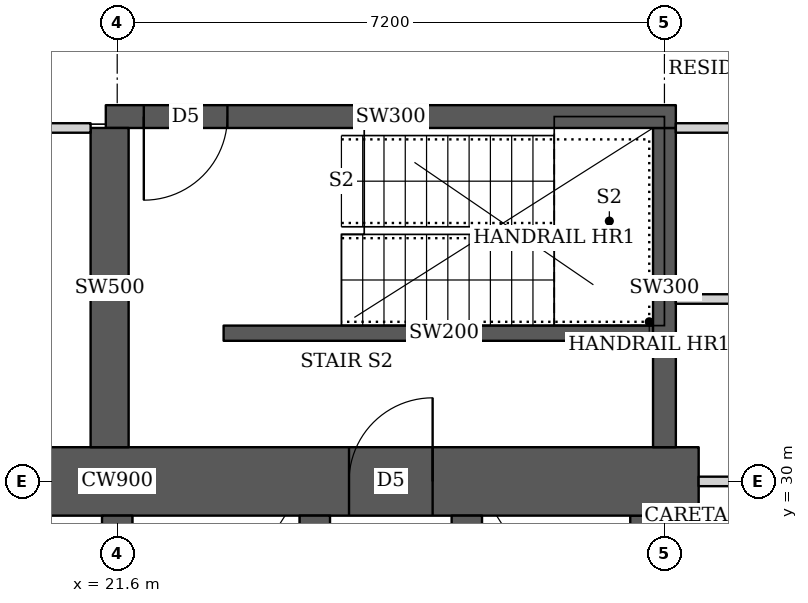
"""IFC4 building model, lengths in metres.
Left out: names, types, materials, properties, quantities, classifications, styles, units other than length and angle.
Written with IfcOpenShell. Run it as: python <this file> out.ifc"""

import sys

from ifc_helpers import new_model, si_unit, direction, frame, frame_2d, origin, place, context, subcontext, project, spatial, rectangle, extrude, element, fill, save


model = new_model("IFC4")
c1 = context("Model", 3, precision=1e-05, world=origin(), true_north=direction((0.0, 1.0)))
c2 = subcontext(c1, "Body", "Model", "MODEL_VIEW")
j1 = project(units=[si_unit("LENGTHUNIT", "METRE"), si_unit("PLANEANGLEUNIT", "RADIAN")], contexts=[c1])
p1 = place(None, origin())
s1 = spatial("IfcSite", under=j1, at=p1, CompositionType="ELEMENT")
p2 = place(p1, origin())
s2 = spatial("IfcBuilding", under=s1, at=p2, CompositionType="ELEMENT")
p3 = place(p2, frame((0.0, 0.0, 180.8)))
s3 = spatial("IfcBuildingStorey", under=s2, at=p3, CompositionType="ELEMENT", Elevation=180.8)
p4 = place(p3, frame((13.95, 30.0, 0.0), z_axis=(0.0, 0.0, 1.0), x_axis=(1.0, 0.0, 0.0)))
e1 = element("IfcWall", 1, at=p4, inside=s3, PredefinedType="SHEAR", context=c2, shape_type="SweptSolid", body=[
    extrude(rectangle(XDim=15.3, YDim=0.9, at=frame_2d((7.65, 0.0))), origin(), (0.0, 0.0, 1.0), 3.75),
])
p5 = place(p4, frame((4.45, 0.0, 0.0)))
e2 = element("IfcOpeningElement", 2, at=p5, cuts=e1, PredefinedType="OPENING", context=c2, shape_type="SweptSolid", body=[
    extrude(rectangle(XDim=1.8, YDim=2.1, at=frame_2d((0.9, 1.05))), frame((0.0, 0.46, 0.0), z_axis=(0.0, -1.0, 0.0), x_axis=(1.0, 0.0, 0.0)), (0.0, 0.0, 1.0), 0.92),
])
p6 = place(p4, frame((10.7, 0.0, 0.0)))
e3 = element("IfcOpeningElement", 3, at=p6, cuts=e1, PredefinedType="OPENING", context=c2, shape_type="SweptSolid", body=[
    extrude(rectangle(XDim=1.1, YDim=2.1, at=frame_2d((0.55, 1.05))), frame((0.0, 0.46, 0.0), z_axis=(0.0, -1.0, 0.0), x_axis=(1.0, 0.0, 0.0)), (0.0, 0.0, 1.0), 0.92),
])
p7 = place(p3, frame((28.8, 15.45, 0.0), z_axis=(0.0, 0.0, 1.0), x_axis=(0.0, 1.0, 0.0)))
e4 = element("IfcWall", 4, at=p7, inside=s3, PredefinedType="SHEAR", context=c2, shape_type="SweptSolid", body=[
    extrude(rectangle(XDim=14.1, YDim=0.9, at=frame_2d((7.05, 0.0))), origin(), (0.0, 0.0, 1.0), 3.75),
])
p8 = place(p3, frame((21.6, 15.45, 0.0), z_axis=(0.0, 0.0, 1.0), x_axis=(0.0, 1.0, 0.0)))
e5 = element("IfcWall", 5, at=p8, inside=s3, PredefinedType="SHEAR", context=c2, shape_type="SweptSolid", body=[
    extrude(rectangle(XDim=14.1, YDim=0.4, at=frame_2d((7.05, 0.0))), origin(), (0.0, 0.0, 1.0), 3.75),
])
p9 = place(p8, frame((0.875, 0.0, 0.0)))
e6 = element("IfcOpeningElement", 6, at=p9, cuts=e5, PredefinedType="OPENING", context=c2, shape_type="SweptSolid", body=[
    extrude(rectangle(XDim=1.1, YDim=2.1, at=frame_2d((0.55, 1.05))), frame((0.0, 0.21, 0.0), z_axis=(0.0, -1.0, 0.0), x_axis=(1.0, 0.0, 0.0)), (0.0, 0.0, 1.0), 0.42),
])
p10 = place(p8, frame((4.625, 0.0, 0.0)))
e7 = element("IfcOpeningElement", 7, at=p10, cuts=e5, PredefinedType="OPENING", context=c2, shape_type="SweptSolid", body=[
    extrude(rectangle(XDim=1.1, YDim=2.1, at=frame_2d((0.55, 1.05))), frame((0.0, 0.21, 0.0), z_axis=(0.0, -1.0, 0.0), x_axis=(1.0, 0.0, 0.0)), (0.0, 0.0, 1.0), 0.42),
])
p11 = place(p8, frame((8.375, 0.0, 0.0)))
e8 = element("IfcOpeningElement", 8, at=p11, cuts=e5, PredefinedType="OPENING", context=c2, shape_type="SweptSolid", body=[
    extrude(rectangle(XDim=1.1, YDim=2.1, at=frame_2d((0.55, 1.05))), frame((0.0, 0.21, 0.0), z_axis=(0.0, -1.0, 0.0), x_axis=(1.0, 0.0, 0.0)), (0.0, 0.0, 1.0), 0.42),
])
p12 = place(p8, frame((12.125, 0.0, 0.0)))
e9 = element("IfcOpeningElement", 9, at=p12, cuts=e5, PredefinedType="OPENING", context=c2, shape_type="SweptSolid", body=[
    extrude(rectangle(XDim=1.1, YDim=2.1, at=frame_2d((0.55, 1.05))), frame((0.0, 0.21, 0.0), z_axis=(0.0, -1.0, 0.0), x_axis=(1.0, 0.0, 0.0)), (0.0, 0.0, 1.0), 0.42),
])
p13 = place(p3, frame((24.2, 15.45, 0.0), z_axis=(0.0, 0.0, 1.0), x_axis=(0.0, 1.0, 0.0)))
e10 = element("IfcWall", 10, at=p13, inside=s3, PredefinedType="SHEAR", context=c2, shape_type="SweptSolid", body=[
    extrude(rectangle(XDim=14.1, YDim=0.4, at=frame_2d((7.05, 0.0))), origin(), (0.0, 0.0, 1.0), 3.75),
])
p14 = place(p3, frame((26.2, 26.45, 0.0), z_axis=(0.0, 0.0, 1.0), x_axis=(0.0, 1.0, 0.0)))
e11 = element("IfcWall", 11, at=p14, inside=s3, PredefinedType="SHEAR", context=c2, shape_type="SweptSolid", body=[
    extrude(rectangle(XDim=3.1, YDim=0.4, at=frame_2d((1.55, 0.0))), origin(), (0.0, 0.0, 1.0), 3.75),
])
p15 = place(p14, frame((1.075, 0.0, 0.0)))
e12 = element("IfcOpeningElement", 12, at=p15, cuts=e11, PredefinedType="OPENING", context=c2, shape_type="SweptSolid", body=[
    extrude(rectangle(XDim=1.2, YDim=2.1, at=frame_2d((0.6, 1.05))), frame((0.0, 0.21, 0.0), z_axis=(0.0, -1.0, 0.0), x_axis=(1.0, 0.0, 0.0)), (0.0, 0.0, 1.0), 0.42),
])
p16 = place(p3, frame((21.45, 34.8, 0.0), z_axis=(0.0, 0.0, 1.0), x_axis=(1.0, 0.0, 0.0)))
e13 = element("IfcWall", 13, at=p16, inside=s3, PredefinedType="SHEAR", context=c2, shape_type="SweptSolid", body=[
    extrude(rectangle(XDim=7.5, YDim=0.3, at=frame_2d((3.75, 0.0))), origin(), (0.0, 0.0, 1.0), 3.75),
])
p17 = place(p16, frame((0.5, 0.0, 0.0)))
e14 = element("IfcOpeningElement", 14, at=p17, cuts=e13, PredefinedType="OPENING", context=c2, shape_type="SweptSolid", body=[
    extrude(rectangle(XDim=1.1, YDim=2.1, at=frame_2d((0.55, 1.05))), frame((0.0, 0.16, 0.0), z_axis=(0.0, -1.0, 0.0), x_axis=(1.0, 0.0, 0.0)), (0.0, 0.0, 1.0), 0.32),
])
p18 = place(p3, frame((21.5, 30.45, 0.0), z_axis=(0.0, 0.0, 1.0), x_axis=(0.0, 1.0, 0.0)))
e15 = element("IfcWall", 15, at=p18, inside=s3, PredefinedType="SHEAR", context=c2, shape_type="SweptSolid", body=[
    extrude(rectangle(XDim=4.2, YDim=0.5, at=frame_2d((2.1, 0.0))), origin(), (0.0, 0.0, 1.0), 3.75),
])
p19 = place(p3, frame((28.8, 30.45, 0.0), z_axis=(0.0, 0.0, 1.0), x_axis=(0.0, 1.0, 0.0)))
e16 = element("IfcWall", 16, at=p19, inside=s3, PredefinedType="SHEAR", context=c2, shape_type="SweptSolid", body=[
    extrude(rectangle(XDim=4.2, YDim=0.3, at=frame_2d((2.1, 0.0))), origin(), (0.0, 0.0, 1.0), 3.75),
])
p20 = place(p3, frame((10.413, 34.65, 0.0), z_axis=(0.0, 0.0, 1.0), x_axis=(1.0, 0.0, 0.0)))
e17 = element("IfcWall", 17, at=p20, inside=s3, PredefinedType="PARTITIONING", context=c2, shape_type="SweptSolid", body=[
    extrude(rectangle(XDim=10.837, YDim=0.125, at=frame_2d((5.418, 0.0))), origin(), (0.0, 0.0, 1.0), 3.5),
])
p21 = place(p20, frame((7.487, 0.0, 0.0)))
e18 = element("IfcOpeningElement", 18, at=p21, cuts=e17, PredefinedType="OPENING", context=c2, shape_type="SweptSolid", body=[
    extrude(rectangle(XDim=1.8, YDim=2.1, at=frame_2d((0.9, 1.05))), frame((0.0, 0.073, 0.0), z_axis=(0.0, -1.0, 0.0), x_axis=(1.0, 0.0, 0.0)), (0.0, 0.0, 1.0), 0.145),
])
p22 = place(p3, frame((28.95, 34.65, 0.0), z_axis=(0.0, 0.0, 1.0), x_axis=(1.0, 0.0, 0.0)))
e19 = element("IfcWall", 19, at=p22, inside=s3, PredefinedType="PARTITIONING", context=c2, shape_type="SweptSolid", body=[
    extrude(rectangle(XDim=4.423, YDim=0.125, at=frame_2d((2.211, 0.0))), origin(), (0.0, 0.0, 1.0), 3.5),
])
p23 = place(p3, frame((29.25, 30.0, 0.0), z_axis=(0.0, 0.0, 1.0), x_axis=(1.0, 0.0, 0.0)))
e20 = element("IfcWall", 20, at=p23, inside=s3, PredefinedType="PARTITIONING", context=c2, shape_type="SweptSolid", body=[
    extrude(rectangle(XDim=2.342, YDim=0.125, at=frame_2d((1.171, 0.0))), origin(), (0.0, 0.0, 1.0), 3.5),
])
p24 = place(p3, frame((28.95, 32.4, 0.0), z_axis=(0.0, 0.0, 1.0), x_axis=(1.0, 0.0, 0.0)))
e21 = element("IfcWall", 21, at=p24, inside=s3, PredefinedType="PARTITIONING", context=c2, shape_type="SweptSolid", body=[
    extrude(rectangle(XDim=2.189, YDim=0.125, at=frame_2d((1.094, 0.0))), origin(), (0.0, 0.0, 1.0), 3.5),
])
p25 = place(p3, frame((23.0, 31.95, 0.0), z_axis=(0.0, 0.0, 1.0), x_axis=(1.0, 0.0, 0.0)))
e22 = element("IfcWall", 22, at=p25, inside=s3, PredefinedType="SHEAR", context=c2, shape_type="SweptSolid", body=[
    extrude(rectangle(XDim=5.8, YDim=0.2, at=frame_2d((2.9, 0.0))), origin(), (0.0, 0.0, 1.0), 3.75),
])
p26 = place(p6, origin())
e23 = element("IfcDoor", 23, at=p26, inside=s3, OperationType="SINGLE_SWING_RIGHT", PredefinedType="DOOR", context=c2, shape_type="SweptSolid", body=[
    extrude(rectangle(XDim=1.1, YDim=2.1, at=frame_2d((0.55, 1.05))), frame((0.0, 0.025, 0.0), z_axis=(0.0, -1.0, 0.0), x_axis=(1.0, 0.0, 0.0)), (0.0, 0.0, 1.0), 0.05),
])
fill(e3, e23)
p27 = place(p17, origin())
e24 = element("IfcDoor", 24, at=p27, inside=s3, OperationType="SINGLE_SWING_RIGHT", PredefinedType="DOOR", context=c2, shape_type="SweptSolid", body=[
    extrude(rectangle(XDim=1.1, YDim=2.1, at=frame_2d((0.55, 1.05))), frame((0.0, 0.025, 0.0), z_axis=(0.0, -1.0, 0.0), x_axis=(1.0, 0.0, 0.0)), (0.0, 0.0, 1.0), 0.05),
])
fill(e14, e24)
save(model, sys.argv[1])
